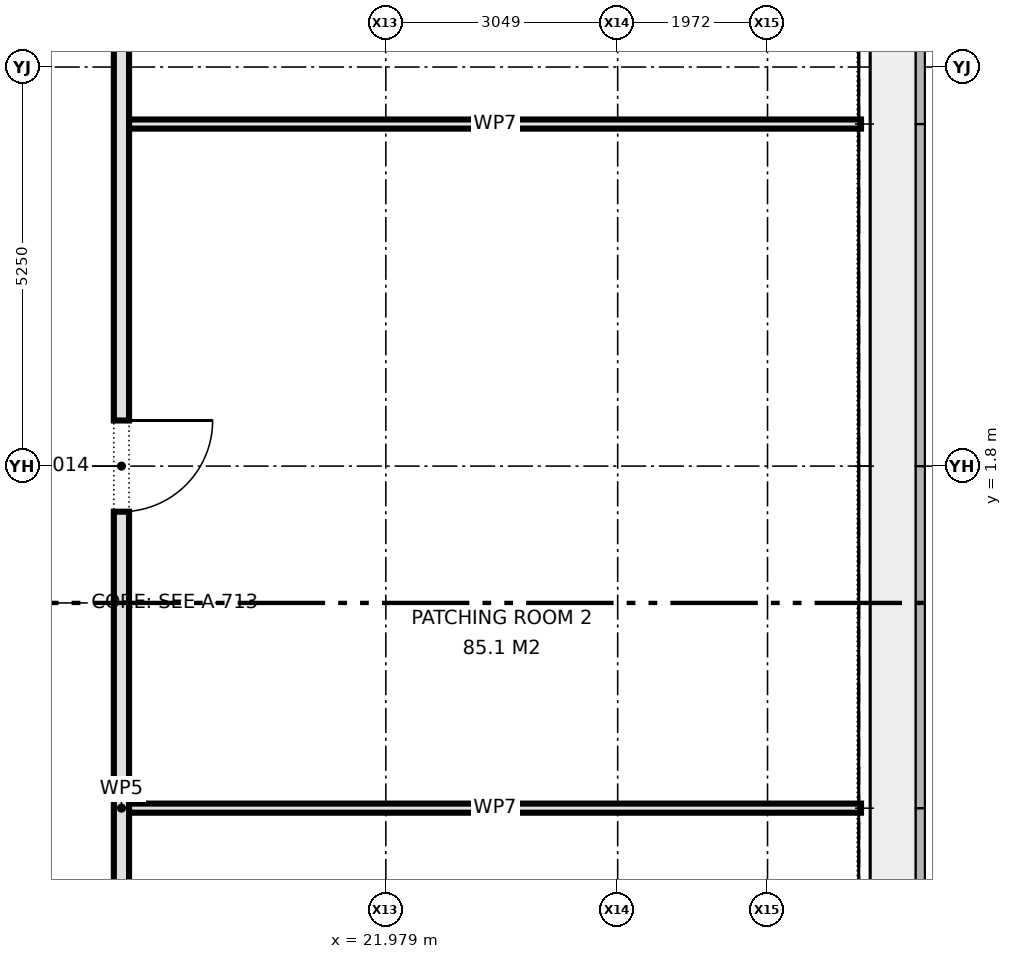
"""IFC4 building model, lengths in metres.
Left out: names, types, materials, properties, quantities, classifications, styles, units other than length and angle.
Written with IfcOpenShell. Run it as: python <this file> out.ifc"""

import sys

from ifc_helpers import new_model, si_unit, direction, frame, frame_2d, origin, place, context, subcontext, project, spatial, rectangle, extrude, element, fill, save


model = new_model("IFC4")
c1 = context("Model", 3, precision=1e-05, world=origin(), true_north=direction((0.0, 1.0)))
c2 = subcontext(c1, "Body", "Model", "MODEL_VIEW")
j1 = project(units=[si_unit("LENGTHUNIT", "METRE"), si_unit("PLANEANGLEUNIT", "RADIAN")], contexts=[c1])
p1 = place(None, origin())
s1 = spatial("IfcSite", under=j1, at=p1, CompositionType="ELEMENT")
p2 = place(p1, origin())
s2 = spatial("IfcBuilding", under=s1, at=p2, CompositionType="ELEMENT")
p3 = place(p2, frame((0.0, 0.0, 95.2)))
s3 = spatial("IfcBuildingStorey", under=s2, at=p3, CompositionType="ELEMENT", Elevation=95.2)
p4 = place(p3, frame((18.5, -13.4, 0.0), z_axis=(0.0, 0.0, 1.0), x_axis=(0.0, 1.0, 0.0)))
e1 = element("IfcWall", 1, at=p4, inside=s3, PredefinedType="PARTITIONING", context=c2, shape_type="SweptSolid", body=[
    extrude(rectangle(XDim=26.8, YDim=0.2, at=frame_2d((13.4, 0.0))), origin(), (0.0, 0.0, 1.0), 4.2),
])
p5 = place(p4, frame((5.6, 0.0, 0.0)))
e2 = element("IfcOpeningElement", 2, at=p5, cuts=e1, PredefinedType="OPENING", context=c2, shape_type="SweptSolid", body=[
    extrude(rectangle(XDim=1.2, YDim=2.1, at=frame_2d((0.6, 1.05))), frame((0.0, 0.11, 0.0), z_axis=(0.0, -1.0, 0.0), x_axis=(1.0, 0.0, 0.0)), (0.0, 0.0, 1.0), 0.22),
])
p6 = place(p4, frame((14.6, 0.0, 0.0)))
e3 = element("IfcOpeningElement", 3, at=p6, cuts=e1, PredefinedType="OPENING", context=c2, shape_type="SweptSolid", body=[
    extrude(rectangle(XDim=1.2, YDim=2.1, at=frame_2d((0.6, 1.05))), frame((0.0, 0.11, 0.0), z_axis=(0.0, -1.0, 0.0), x_axis=(1.0, 0.0, 0.0)), (0.0, 0.0, 1.0), 0.22),
])
p7 = place(p4, frame((21.05, 0.0, 0.0)))
e4 = element("IfcOpeningElement", 4, at=p7, cuts=e1, PredefinedType="OPENING", context=c2, shape_type="SweptSolid", body=[
    extrude(rectangle(XDim=1.8, YDim=2.1, at=frame_2d((0.9, 1.05))), frame((0.0, 0.11, 0.0), z_axis=(0.0, -1.0, 0.0), x_axis=(1.0, 0.0, 0.0)), (0.0, 0.0, 1.0), 0.22),
])
for number, where, z_axis, x_axis in (
    (5, (18.6, -2.7, 0.0), (0.0, 0.0, 1.0), (1.0, 0.0, 0.0)),
    (6, (18.6, 6.3, 0.0), (0.0, 0.0, 1.0), (1.0, 0.0, 0.0)),
):
    element("IfcWall", number, at=place(p3, frame(where, z_axis=z_axis, x_axis=x_axis)), inside=s3, PredefinedType="PARTITIONING", context=c2, shape_type="SweptSolid", body=[
        extrude(rectangle(XDim=9.63, YDim=0.12, at=frame_2d((4.815, 0.0))), origin(), (0.0, 0.0, 1.0), 4.2),
    ])
p8 = place(p6, frame((1.2, 0.0, 0.0), z_axis=(0.0, 0.0, 1.0), x_axis=(-1.0, 0.0, 0.0)))
e7 = element("IfcDoor", 7, at=p8, inside=s3, OperationType="SINGLE_SWING_LEFT", PredefinedType="DOOR", context=c2, shape_type="SweptSolid", body=[
    extrude(rectangle(XDim=1.2, YDim=2.1, at=frame_2d((0.6, 1.05))), frame((0.0, 0.025, 0.0), z_axis=(0.0, -1.0, 0.0), x_axis=(1.0, 0.0, 0.0)), (0.0, 0.0, 1.0), 0.05),
])
fill(e3, e7)
save(model, sys.argv[1])
